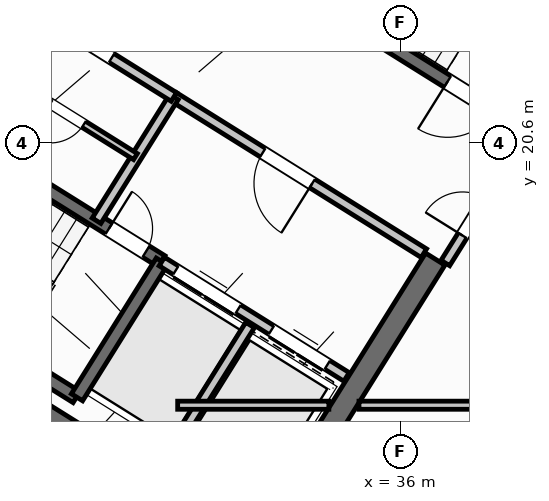
"""IFC4 building model, lengths in metres.
Left out: names, types, materials, properties, quantities, classifications, styles, units other than length and angle.
Written with IfcOpenShell. Run it as: python <this file> out.ifc"""

import sys

from ifc_helpers import new_model, si_unit, direction, frame, frame_2d, origin, place, context, subcontext, project, spatial, rectangle, extrude, source, transform, mapped, element, fill, save


model = new_model("IFC4")
c1 = context("Model", 3, precision=1e-05, world=origin(), true_north=direction((0.0, 1.0)))
c2 = subcontext(c1, "Body", "Model", "MODEL_VIEW")
j1 = project(units=[si_unit("LENGTHUNIT", "METRE"), si_unit("PLANEANGLEUNIT", "RADIAN")], contexts=[c1])
p1 = place(None, origin())
s1 = spatial("IfcSite", under=j1, at=p1, CompositionType="ELEMENT")
p2 = place(p1, origin())
s2 = spatial("IfcBuilding", under=s1, at=p2, CompositionType="ELEMENT")
p3 = place(p2, frame((0.0, 0.0, 233.7)))
s3 = spatial("IfcBuildingStorey", under=s2, at=p3, CompositionType="ELEMENT", Elevation=233.7)
p4 = place(p3, frame((33.324, 12.503, 0.0), z_axis=(0.0, 0.0, 1.0), x_axis=(-0.848043529849, 0.529926571782, 0.0)))
e1 = element("IfcWall", 1, at=p4, inside=s3, PredefinedType="SHEAR", context=c2, shape_type="SweptSolid", body=[
    extrude(rectangle(XDim=13.04, YDim=0.45, at=frame_2d((6.52, 0.0))), origin(), (0.0, 0.0, 1.0), 4.55),
])
p5 = place(p3, frame((36.683, 18.304, 0.0), z_axis=(0.0, 0.0, 1.0), x_axis=(-0.529904039071, -0.848057609704, 0.0)))
e2 = element("IfcWall", 2, at=p5, inside=s3, PredefinedType="SHEAR", context=c2, shape_type="SweptSolid", body=[
    extrude(rectangle(XDim=6.475, YDim=0.45, at=frame_2d((3.238, 0.0))), origin(), (0.0, 0.0, 1.0), 4.55),
])
p6 = place(p3, frame((29.268, 6.429, 0.0), z_axis=(0.0, 0.0, 1.0), x_axis=(-0.848049971435, 0.529916263149, 0.0)))
e3 = element("IfcWall", 3, at=p6, inside=s3, PredefinedType="STANDARD", context=c2, shape_type="SweptSolid", body=[
    extrude(rectangle(XDim=31.588, YDim=0.32, at=frame_2d((15.794, 0.0))), origin(), (0.0, 0.0, 1.0), 4.55),
])
p7 = place(p6, frame((15.901, 0.0, 0.0)))
e4 = element("IfcOpeningElement", 4, at=p7, cuts=e3, PredefinedType="OPENING", context=c2, shape_type="SweptSolid", body=[
    extrude(rectangle(XDim=1.2, YDim=2.15, at=frame_2d((0.6, 1.075))), frame((0.0, 0.17, 0.0), z_axis=(0.0, -1.0, 0.0), x_axis=(1.0, 0.0, 0.0)), (0.0, 0.0, 1.0), 0.34),
])
p8 = place(p6, frame((3.454, 0.0, 0.95)))
e5 = element("IfcOpeningElement", 5, at=p8, cuts=e3, PredefinedType="OPENING", context=c2, shape_type="SweptSolid", body=[
    extrude(rectangle(XDim=1.2, YDim=1.4, at=frame_2d((0.6, 0.7))), frame((0.0, 0.17, 0.0), z_axis=(0.0, -1.0, 0.0), x_axis=(1.0, 0.0, 0.0)), (0.0, 0.0, 1.0), 0.34),
])
p9 = place(p6, frame((7.561, 0.0, 0.85)))
e6 = element("IfcOpeningElement", 6, at=p9, cuts=e3, PredefinedType="OPENING", context=c2, shape_type="SweptSolid", body=[
    extrude(rectangle(XDim=1.8, YDim=1.5, at=frame_2d((0.9, 0.75))), frame((0.0, 0.17, 0.0), z_axis=(0.0, -1.0, 0.0), x_axis=(1.0, 0.0, 0.0)), (0.0, 0.0, 1.0), 0.34),
])
p10 = place(p6, frame((28.254, 0.0, 0.95)))
e7 = element("IfcOpeningElement", 7, at=p10, cuts=e3, PredefinedType="OPENING", context=c2, shape_type="SweptSolid", body=[
    extrude(rectangle(XDim=1.2, YDim=1.4, at=frame_2d((0.6, 0.7))), frame((0.0, 0.17, 0.0), z_axis=(0.0, -1.0, 0.0), x_axis=(1.0, 0.0, 0.0)), (0.0, 0.0, 1.0), 0.34),
])
p11 = place(p6, frame((19.234, 0.0, 1.0)))
e8 = element("IfcOpeningElement", 8, at=p11, cuts=e3, PredefinedType="OPENING", context=c2, shape_type="SweptSolid", body=[
    extrude(rectangle(XDim=0.9, YDim=1.25, at=frame_2d((0.45, 0.625))), frame((0.0, 0.17, 0.0), z_axis=(0.0, -1.0, 0.0), x_axis=(1.0, 0.0, 0.0)), (0.0, 0.0, 1.0), 0.34),
])
p12 = place(p6, frame((21.721, 0.0, 1.0)))
e9 = element("IfcOpeningElement", 9, at=p12, cuts=e3, PredefinedType="OPENING", context=c2, shape_type="SweptSolid", body=[
    extrude(rectangle(XDim=0.65, YDim=1.15, at=frame_2d((0.325, 0.575))), frame((0.0, 0.17, 0.0), z_axis=(0.0, -1.0, 0.0), x_axis=(1.0, 0.0, 0.0)), (0.0, 0.0, 1.0), 0.34),
])
p13 = place(p6, frame((23.631, 0.0, 1.0)))
e10 = element("IfcOpeningElement", 10, at=p13, cuts=e3, PredefinedType="OPENING", context=c2, shape_type="SweptSolid", body=[
    extrude(rectangle(XDim=0.9, YDim=1.25, at=frame_2d((0.45, 0.625))), frame((0.0, 0.17, 0.0), z_axis=(0.0, -1.0, 0.0), x_axis=(1.0, 0.0, 0.0)), (0.0, 0.0, 1.0), 0.34),
])
p14 = place(p6, frame((25.666, 0.0, 1.0)))
e11 = element("IfcOpeningElement", 11, at=p14, cuts=e3, PredefinedType="OPENING", context=c2, shape_type="SweptSolid", body=[
    extrude(rectangle(XDim=0.9, YDim=1.25, at=frame_2d((0.45, 0.625))), frame((0.0, 0.17, 0.0), z_axis=(0.0, -1.0, 0.0), x_axis=(1.0, 0.0, 0.0)), (0.0, 0.0, 1.0), 0.34),
])
p15 = place(p3, frame((29.605, 15.581, 0.0), z_axis=(0.0, 0.0, 1.0), x_axis=(-0.848036911448, 0.529937163087, 0.0)))
e12 = element("IfcWall", 12, at=p15, inside=s3, PredefinedType="SHEAR", context=c2, shape_type="SweptSolid", body=[
    extrude(rectangle(XDim=7.46, YDim=0.26, at=frame_2d((3.73, 0.0))), origin(), (0.0, 0.0, 1.0), 4.55),
])
p16 = place(p3, frame((31.28, 18.261, 0.0), z_axis=(0.0, 0.0, 1.0), x_axis=(-0.848051618787, 0.529913626805, 0.0)))
e13 = element("IfcWall", 13, at=p16, inside=s3, PredefinedType="SHEAR", context=c2, shape_type="SweptSolid", body=[
    extrude(rectangle(XDim=7.46, YDim=0.26, at=frame_2d((3.73, 0.0))), origin(), (0.0, 0.0, 1.0), 4.55),
])
p17 = place(p16, frame((0.36, 0.0, 0.0)))
e14 = element("IfcOpeningElement", 14, at=p17, cuts=e13, PredefinedType="OPENING", context=c2, shape_type="SweptSolid", body=[
    extrude(rectangle(XDim=0.86, YDim=2.05, at=frame_2d((0.43, 1.025))), frame((0.0, 0.14, 0.0), z_axis=(0.0, -1.0, 0.0), x_axis=(1.0, 0.0, 0.0)), (0.0, 0.0, 1.0), 0.28),
])
p18 = place(p3, frame((31.288, 18.256, 0.0), z_axis=(0.0, 0.0, 1.0), x_axis=(-0.529943379326, -0.848033026897, 0.0)))
e15 = element("IfcWall", 15, at=p18, inside=s3, PredefinedType="SHEAR", context=c2, shape_type="SweptSolid", body=[
    extrude(rectangle(XDim=3.16, YDim=0.26, at=frame_2d((1.58, 0.0))), origin(), (0.0, 0.0, 1.0), 4.55),
])
p19 = place(p3, frame((38.046, 21.108, 0.0), z_axis=(0.0, 0.0, 1.0), x_axis=(-0.848054434086, 0.529909121291, 0.0)))
e16 = element("IfcWall", 16, at=p19, inside=s3, PredefinedType="SHEAR", context=c2, shape_type="SweptSolid", body=[
    extrude(rectangle(XDim=7.33, YDim=0.26, at=frame_2d((3.665, 0.0))), origin(), (0.0, 0.0, 1.0), 4.55),
])
p20 = place(p19, frame((0.22, 0.0, 0.0)))
e17 = element("IfcOpeningElement", 17, at=p20, cuts=e16, PredefinedType="OPENING", context=c2, shape_type="SweptSolid", body=[
    extrude(rectangle(XDim=1.1, YDim=2.1, at=frame_2d((0.55, 1.05))), frame((0.0, 0.14, 0.0), z_axis=(0.0, -1.0, 0.0), x_axis=(1.0, 0.0, 0.0)), (0.0, 0.0, 1.0), 0.28),
])
p21 = place(p3, frame((34.933, 15.978, 0.0), z_axis=(0.0, 0.0, 1.0), x_axis=(-0.848055739377, 0.529907032327, 0.0)))
e18 = element("IfcWall", 18, at=p21, inside=s3, PredefinedType="STANDARD", context=c2, shape_type="SweptSolid", body=[
    extrude(rectangle(XDim=4.298, YDim=0.2, at=frame_2d((2.149, 0.0))), origin(), (0.0, 0.0, 1.0), 4.54),
])
p22 = place(p21, frame((0.448, 0.0, 0.0)))
e19 = element("IfcOpeningElement", 19, at=p22, cuts=e18, PredefinedType="OPENING", context=c2, shape_type="SweptSolid", body=[
    extrude(rectangle(XDim=1.3, YDim=2.2, at=frame_2d((0.65, 1.1))), frame((0.0, 0.11, 0.0), z_axis=(0.0, -1.0, 0.0), x_axis=(1.0, 0.0, 0.0)), (0.0, 0.0, 1.0), 0.22),
])
p23 = place(p21, frame((2.523, 0.0, 0.0)))
e20 = element("IfcOpeningElement", 20, at=p23, cuts=e18, PredefinedType="OPENING", context=c2, shape_type="SweptSolid", body=[
    extrude(rectangle(XDim=1.45, YDim=2.25, at=frame_2d((0.725, 1.125))), frame((0.0, 0.11, 0.0), z_axis=(0.0, -1.0, 0.0), x_axis=(1.0, 0.0, 0.0)), (0.0, 0.0, 1.0), 0.22),
])
p24 = place(p3, frame((36.459, 18.421, 0.0), z_axis=(0.0, 0.0, 1.0), x_axis=(-0.848059591691, 0.529900867089, 0.0)))
e21 = element("IfcWall", 21, at=p24, inside=s3, PredefinedType="STANDARD", context=c2, shape_type="SweptSolid", body=[
    extrude(rectangle(XDim=5.818, YDim=0.2, at=frame_2d((2.909, 0.0))), origin(), (0.0, 0.0, 1.0), 4.54),
])
p25 = place(p24, frame((2.598, 0.0, 0.0)))
e22 = element("IfcOpeningElement", 22, at=p25, cuts=e21, PredefinedType="OPENING", context=c2, shape_type="SweptSolid", body=[
    extrude(rectangle(XDim=1.15, YDim=2.1, at=frame_2d((0.575, 1.05))), frame((0.0, 0.11, 0.0), z_axis=(0.0, -1.0, 0.0), x_axis=(1.0, 0.0, 0.0)), (0.0, 0.0, 1.0), 0.22),
])
p26 = place(p3, frame((33.029, 17.003, 0.0), z_axis=(0.0, 0.0, 1.0), x_axis=(-0.529916267533, -0.848049968695, 0.0)))
e23 = element("IfcWall", 23, at=p26, inside=s3, PredefinedType="STANDARD", context=c2, shape_type="SweptSolid", body=[
    extrude(rectangle(XDim=2.92, YDim=0.2, at=frame_2d((1.46, 0.0))), origin(), (0.0, 0.0, 1.0), 4.54),
])
p27 = place(p3, frame((31.525, 21.504, 0.0), z_axis=(0.0, 0.0, 1.0), x_axis=(-0.529907497854, -0.848055448493, 0.0)))
e24 = element("IfcWall", 24, at=p27, inside=s3, PredefinedType="STANDARD", context=c2, shape_type="SweptSolid", body=[
    extrude(rectangle(XDim=2.88, YDim=0.2, at=frame_2d((1.44, 0.0))), origin(), (0.0, 0.0, 1.0), 4.54),
])
p28 = place(p3, frame((31.525, 21.504, 0.0), z_axis=(0.0, 0.0, 1.0), x_axis=(-0.848042066329, 0.529928913853, 0.0)))
e25 = element("IfcWall", 25, at=p28, inside=s3, PredefinedType="STANDARD", context=c2, shape_type="SweptSolid", body=[
    extrude(rectangle(XDim=6.268, YDim=0.2, at=frame_2d((3.134, 0.0))), origin(), (0.0, 0.0, 1.0), 4.54),
])
p29 = place(p28, frame((4.4, 0.0, 0.0)))
e26 = element("IfcOpeningElement", 26, at=p29, cuts=e25, PredefinedType="OPENING", context=c2, shape_type="SweptSolid", body=[
    extrude(rectangle(XDim=0.86, YDim=2.05, at=frame_2d((0.43, 1.025))), frame((0.0, 0.11, 0.0), z_axis=(0.0, -1.0, 0.0), x_axis=(1.0, 0.0, 0.0)), (0.0, 0.0, 1.0), 0.22),
])
p30 = place(p28, frame((1.45, 0.0, 0.0)))
e27 = element("IfcOpeningElement", 27, at=p30, cuts=e25, PredefinedType="OPENING", context=c2, shape_type="SweptSolid", body=[
    extrude(rectangle(XDim=0.86, YDim=2.05, at=frame_2d((0.43, 1.025))), frame((0.0, 0.11, 0.0), z_axis=(0.0, -1.0, 0.0), x_axis=(1.0, 0.0, 0.0)), (0.0, 0.0, 1.0), 0.22),
])
p31 = place(p3, frame((30.766, 20.327, 0.0), z_axis=(0.0, 0.0, 1.0), x_axis=(-0.848052663127, 0.529911955482, 0.0)))
e28 = element("IfcWall", 28, at=p31, inside=s3, PredefinedType="PLUMBINGWALL", context=c2, shape_type="SweptSolid", body=[
    extrude(rectangle(XDim=3.28, YDim=0.14, at=frame_2d((1.64, 0.0))), origin(), (0.0, 0.0, 1.0), 4.54),
])
p32 = place(p31, frame((1.2, 0.0, 0.0)))
e29 = element("IfcOpeningElement", 29, at=p32, cuts=e28, PredefinedType="OPENING", context=c2, shape_type="SweptSolid", body=[
    extrude(rectangle(XDim=0.78, YDim=2.05, at=frame_2d((0.39, 1.025))), frame((0.0, 0.08, 0.0), z_axis=(0.0, -1.0, 0.0), x_axis=(1.0, 0.0, 0.0)), (0.0, 0.0, 1.0), 0.16),
])
p33 = place(p3, frame((32.164, 10.374, 0.0), z_axis=(0.0, 0.0, 1.0), x_axis=(-0.848044107957, 0.529925646633, 0.0)))
e30 = element("IfcWall", 30, at=p33, inside=s3, PredefinedType="PARTITIONING", context=c2, shape_type="SweptSolid", body=[
    extrude(rectangle(XDim=15.57, YDim=0.16, at=frame_2d((7.785, 0.0))), origin(), (0.0, 0.0, 1.0), 4.54),
])
p34 = place(p33, frame((4.1, 0.0, 0.0)))
e31 = element("IfcOpeningElement", 31, at=p34, cuts=e30, PredefinedType="OPENING", context=c2, shape_type="SweptSolid", body=[
    extrude(rectangle(XDim=0.96, YDim=2.08, at=frame_2d((0.48, 1.04))), frame((0.0, 0.09, 0.0), z_axis=(0.0, -1.0, 0.0), x_axis=(1.0, 0.0, 0.0)), (0.0, 0.0, 1.0), 0.18),
])
p35 = place(p33, frame((8.2, 0.0, 0.0)))
e32 = element("IfcOpeningElement", 32, at=p35, cuts=e30, PredefinedType="OPENING", context=c2, shape_type="SweptSolid", body=[
    extrude(rectangle(XDim=1.7, YDim=2.2, at=frame_2d((0.85, 1.1))), frame((0.0, 0.09, 0.0), z_axis=(0.0, -1.0, 0.0), x_axis=(1.0, 0.0, 0.0)), (0.0, 0.0, 1.0), 0.18),
])
p36 = place(p3, frame((38.451, 20.737, 0.0), z_axis=(0.0, 0.0, 1.0), x_axis=(-0.529924799939, -0.848044637038, 0.0)))
e33 = element("IfcWall", 33, at=p36, inside=s3, PredefinedType="STANDARD", context=c2, shape_type="SweptSolid", body=[
    extrude(rectangle(XDim=2.96, YDim=0.2, at=frame_2d((1.48, 0.0))), origin(), (0.0, 0.0, 1.0), 4.54),
])
p37 = place(p36, frame((1.46, 0.0, 0.0)))
e34 = element("IfcOpeningElement", 34, at=p37, cuts=e33, PredefinedType="OPENING", context=c2, shape_type="SweptSolid", body=[
    extrude(rectangle(XDim=0.86, YDim=2.05, at=frame_2d((0.43, 1.025))), frame((0.0, 0.11, 0.0), z_axis=(0.0, -1.0, 0.0), x_axis=(1.0, 0.0, 0.0)), (0.0, 0.0, 1.0), 0.22),
])
p38 = place(p3, frame((31.6, 15.42, 0.0), z_axis=(0.0, 0.0, 1.0), x_axis=(1.0, 0.0, 0.0)))
e35 = element("IfcWall", 35, at=p38, inside=s3, PredefinedType="PARTITIONING", context=c2, shape_type="SweptSolid", body=[
    extrude(rectangle(XDim=2.984, YDim=0.16, at=frame_2d((1.492, 0.0))), origin(), (0.0, 0.0, 1.0), 4.54),
])
p39 = place(p3, frame((35.178, 15.42, 0.0), z_axis=(0.0, 0.0, 1.0), x_axis=(1.0, 0.0, 0.0)))
e36 = element("IfcWall", 36, at=p39, inside=s3, PredefinedType="PARTITIONING", context=c2, shape_type="SweptSolid", body=[
    extrude(rectangle(XDim=15.552, YDim=0.16, at=frame_2d((7.776, 0.0))), origin(), (0.0, 0.0, 1.0), 4.54),
])
p40 = place(p39, frame((3.294, 0.0, 0.0)))
e37 = element("IfcOpeningElement", 37, at=p40, cuts=e36, PredefinedType="OPENING", context=c2, shape_type="SweptSolid", body=[
    extrude(rectangle(XDim=1.0, YDim=2.1, at=frame_2d((0.5, 1.05))), frame((0.0, 0.09, 0.0), z_axis=(0.0, -1.0, 0.0), x_axis=(1.0, 0.0, 0.0)), (0.0, 0.0, 1.0), 0.18),
])
m1 = source(origin(), c2, "Body", "SweptSolid", [
    extrude(rectangle(XDim=0.86, YDim=2.05, at=frame_2d((0.43, 1.025))), frame((0.0, 0.025, 0.0), z_axis=(0.0, -1.0, 0.0), x_axis=(1.0, 0.0, 0.0)), (0.0, 0.0, 1.0), 0.05),
])
p41 = place(p17, frame((0.86, 0.0, 0.0), z_axis=(0.0, 0.0, 1.0), x_axis=(-1.0, 0.0, 0.0)))
e38 = element("IfcDoor", 38, at=p41, inside=s3, OperationType="SINGLE_SWING_LEFT", PredefinedType="DOOR", context=c2, shape_type="MappedRepresentation", body=[
    mapped(m1, transform((0.0, 0.0, 0.0), scale=1.0)),
])
fill(e14, e38)
m2 = source(origin(), c2, "Body", "SweptSolid", [
    extrude(rectangle(XDim=1.1, YDim=2.1, at=frame_2d((0.55, 1.05))), frame((0.0, 0.025, 0.0), z_axis=(0.0, -1.0, 0.0), x_axis=(1.0, 0.0, 0.0)), (0.0, 0.0, 1.0), 0.05),
])
p42 = place(p20, origin())
e39 = element("IfcDoor", 39, at=p42, inside=s3, OperationType="SINGLE_SWING_RIGHT", PredefinedType="DOOR", context=c2, shape_type="MappedRepresentation", body=[
    mapped(m2, transform((0.0, 0.0, 0.0), scale=1.0)),
])
fill(e17, e39)
m3 = source(origin(), c2, "Body", "SweptSolid", [
    extrude(rectangle(XDim=1.15, YDim=2.1, at=frame_2d((0.575, 1.05))), frame((0.0, 0.025, 0.0), z_axis=(0.0, -1.0, 0.0), x_axis=(1.0, 0.0, 0.0)), (0.0, 0.0, 1.0), 0.05),
])
p43 = place(p25, origin())
e40 = element("IfcDoor", 40, at=p43, inside=s3, OperationType="SINGLE_SWING_LEFT", PredefinedType="DOOR", context=c2, shape_type="MappedRepresentation", body=[
    mapped(m3, transform((0.0, 0.0, 0.0), scale=1.0)),
])
fill(e22, e40)
m4 = source(origin(), c2, "Body", "SweptSolid", [
    extrude(rectangle(XDim=1.3, YDim=2.2, at=frame_2d((0.65, 1.1))), frame((0.0, 0.025, 0.0), z_axis=(0.0, -1.0, 0.0), x_axis=(1.0, 0.0, 0.0)), (0.0, 0.0, 1.0), 0.05),
])
p44 = place(p22, origin())
e41 = element("IfcDoor", 41, at=p44, inside=s3, OperationType="DOUBLE_DOOR_SLIDING", PredefinedType="DOOR", context=c2, shape_type="MappedRepresentation", body=[
    mapped(m4, transform((0.0, 0.0, 0.0), scale=1.0)),
])
fill(e19, e41)
m5 = source(origin(), c2, "Body", "SweptSolid", [
    extrude(rectangle(XDim=1.45, YDim=2.25, at=frame_2d((0.725, 1.125))), frame((0.0, 0.025, 0.0), z_axis=(0.0, -1.0, 0.0), x_axis=(1.0, 0.0, 0.0)), (0.0, 0.0, 1.0), 0.05),
])
p45 = place(p23, origin())
e42 = element("IfcDoor", 42, at=p45, inside=s3, OperationType="DOUBLE_DOOR_SLIDING", PredefinedType="DOOR", context=c2, shape_type="MappedRepresentation", body=[
    mapped(m5, transform((0.0, 0.0, 0.0), scale=1.0)),
])
fill(e20, e42)
p46 = place(p30, frame((0.86, 0.0, 0.0), z_axis=(0.0, 0.0, 1.0), x_axis=(-1.0, 0.0, 0.0)))
e43 = element("IfcDoor", 43, at=p46, inside=s3, OperationType="SINGLE_SWING_LEFT", PredefinedType="DOOR", context=c2, shape_type="MappedRepresentation", body=[
    mapped(m1, transform((0.0, 0.0, 0.0), scale=1.0)),
])
fill(e27, e43)
m6 = source(origin(), c2, "Body", "SweptSolid", [
    extrude(rectangle(XDim=0.78, YDim=2.05, at=frame_2d((0.39, 1.025))), frame((0.0, 0.025, 0.0), z_axis=(0.0, -1.0, 0.0), x_axis=(1.0, 0.0, 0.0)), (0.0, 0.0, 1.0), 0.05),
])
p47 = place(p32, origin())
e44 = element("IfcDoor", 44, at=p47, inside=s3, OperationType="SINGLE_SWING_RIGHT", PredefinedType="DOOR", context=c2, shape_type="MappedRepresentation", body=[
    mapped(m6, transform((0.0, 0.0, 0.0), scale=1.0)),
])
fill(e29, e44)
p48 = place(p37, frame((0.86, 0.0, 0.0), z_axis=(0.0, 0.0, 1.0), x_axis=(-1.0, 0.0, 0.0)))
e45 = element("IfcDoor", 45, at=p48, inside=s3, OperationType="SINGLE_SWING_LEFT", PredefinedType="DOOR", context=c2, shape_type="MappedRepresentation", body=[
    mapped(m1, transform((0.0, 0.0, 0.0), scale=1.0)),
])
fill(e34, e45)
save(model, sys.argv[1])
